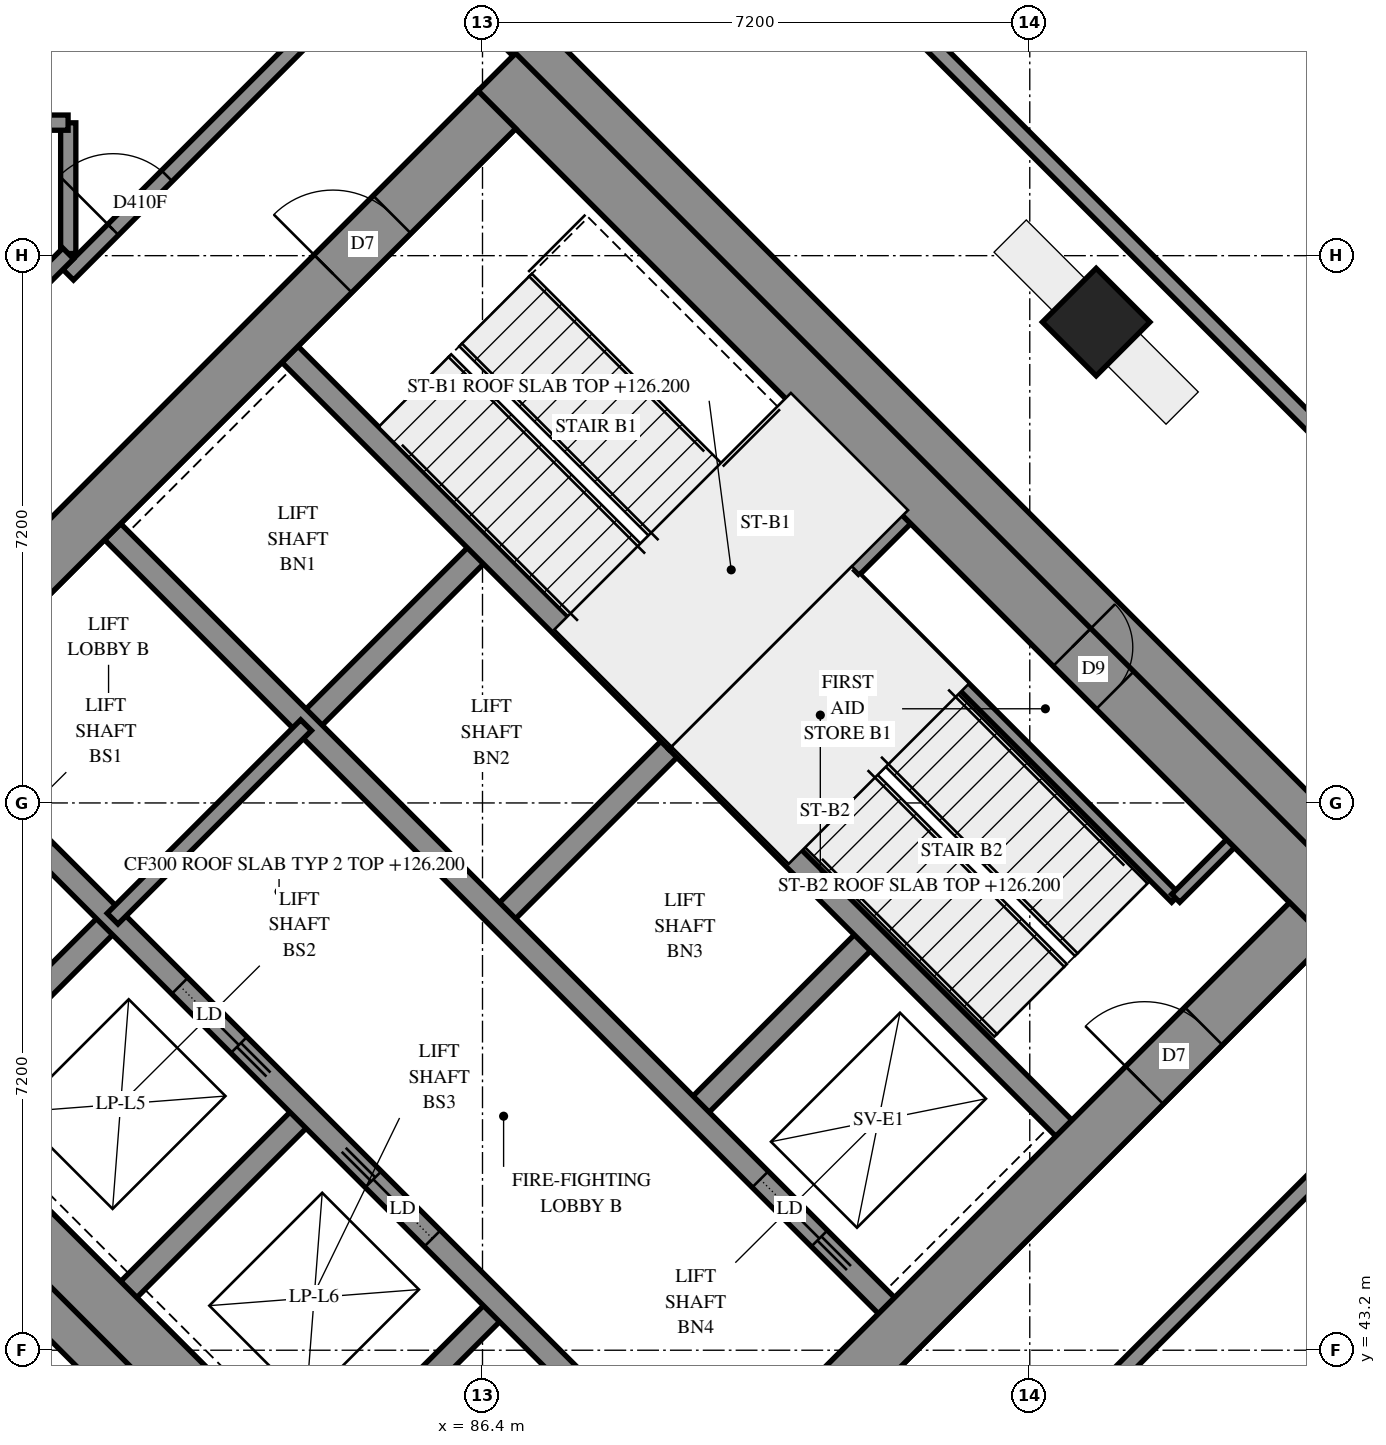
"""IFC4 building model, lengths in metres.
Left out: names, types, materials, properties, quantities, classifications, styles, units other than length and angle.
Written with IfcOpenShell. Run it as: python <this file> out.ifc"""

import sys

from ifc_helpers import new_model, si_unit, direction, frame, frame_2d, origin, origin_2d, place, context, subcontext, project, spatial, polyline, rectangle, outline, extrude, element, fill, save


model = new_model("IFC4")
c1 = context("Model", 3, precision=1e-05, world=origin(), true_north=direction((0.0, 1.0)))
c2 = subcontext(c1, "Body", "Model", "MODEL_VIEW")
j1 = project(units=[si_unit("LENGTHUNIT", "METRE"), si_unit("PLANEANGLEUNIT", "RADIAN")], contexts=[c1])
p1 = place(None, origin())
s1 = spatial("IfcSite", under=j1, at=p1, CompositionType="ELEMENT")
p2 = place(p1, origin())
s2 = spatial("IfcBuilding", under=s1, at=p2, CompositionType="ELEMENT")
p3 = place(p2, frame((0.0, 0.0, 126.2)))
s3 = spatial("IfcBuildingStorey", under=s2, at=p3, CompositionType="ELEMENT", Elevation=126.2)
p4 = place(p3, frame((94.474, 56.727, -0.3), z_axis=(0.0, 0.0, 1.0), x_axis=(0.7071067812, -0.7071067812, 0.0)))
e1 = element("IfcColumn", 1, at=p4, inside=s3, PredefinedType="COLUMN", context=c2, shape_type="SweptSolid", body=[
    extrude(rectangle(XDim=1.0, YDim=1.0, at=origin_2d()), origin(), (0.0, 0.0, 1.0), 5.0),
])
p5 = place(p3, frame((75.912, 49.337, -0.3), z_axis=(0.0, 0.0, 1.0), x_axis=(0.7071036166, -0.7071099457, 0.0)))
e2 = element("IfcWall", 2, at=p5, inside=s3, PredefinedType="SHEAR", context=c2, shape_type="SweptSolid", body=[
    extrude(rectangle(XDim=15.8, YDim=0.7, at=frame_2d((7.9, 0.0))), origin(), (0.0, 0.0, 1.0), 4.3),
])
p6 = place(p3, frame((86.589, 60.014, -0.3), z_axis=(0.0, 0.0, 1.0), x_axis=(0.7071099457, -0.7071036166, 0.0)))
e3 = element("IfcWall", 3, at=p6, inside=s3, PredefinedType="SHEAR", context=c2, shape_type="SweptSolid", body=[
    extrude(rectangle(XDim=15.8, YDim=0.7, at=frame_2d((7.9, 0.0))), origin(), (0.0, 0.0, 1.0), 4.3),
])
p7 = place(p6, frame((10.7, 0.0, 0.3)))
e4 = element("IfcOpeningElement", 4, at=p7, cuts=e3, PredefinedType="OPENING", context=c2, shape_type="SweptSolid", body=[
    extrude(rectangle(XDim=0.8, YDim=2.1, at=frame_2d((0.4, 1.05))), frame((0.0, 0.36, 0.0), z_axis=(0.0, -1.0, 0.0), x_axis=(1.0, 0.0, 0.0)), (0.0, 0.0, 1.0), 0.72),
])
p8 = place(p3, frame((76.407, 49.337, -0.3), z_axis=(0.0, 0.0, 1.0), x_axis=(0.7071067812, 0.7071067812, 0.0)))
e5 = element("IfcWall", 5, at=p8, inside=s3, PredefinedType="SHEAR", context=c2, shape_type="SweptSolid", body=[
    extrude(rectangle(XDim=14.4, YDim=0.7, at=frame_2d((7.2, 0.0))), origin(), (0.0, 0.0, 1.0), 4.3),
])
p9 = place(p8, frame((4.55, 0.0, 0.3)))
e6 = element("IfcOpeningElement", 6, at=p9, cuts=e5, PredefinedType="OPENING", context=c2, shape_type="SweptSolid", body=[
    extrude(rectangle(XDim=1.1, YDim=2.1, at=frame_2d((0.55, 1.05))), frame((0.0, 0.36, 0.0), z_axis=(0.0, -1.0, 0.0), x_axis=(1.0, 0.0, 0.0)), (0.0, 0.0, 1.0), 0.72),
])
p10 = place(p8, frame((11.35, 0.0, 0.3)))
e7 = element("IfcOpeningElement", 7, at=p10, cuts=e5, PredefinedType="OPENING", context=c2, shape_type="SweptSolid", body=[
    extrude(rectangle(XDim=1.1, YDim=2.1, at=frame_2d((0.55, 1.05))), frame((0.0, 0.36, 0.0), z_axis=(0.0, -1.0, 0.0), x_axis=(1.0, 0.0, 0.0)), (0.0, 0.0, 1.0), 0.72),
])
p11 = place(p3, frame((87.084, 38.66, -0.3), z_axis=(0.0, 0.0, 1.0), x_axis=(0.7071067812, 0.7071067812, 0.0)))
e8 = element("IfcWall", 8, at=p11, inside=s3, PredefinedType="SHEAR", context=c2, shape_type="SweptSolid", body=[
    extrude(rectangle(XDim=14.4, YDim=0.7, at=frame_2d((7.2, 0.0))), origin(), (0.0, 0.0, 1.0), 4.3),
])
p12 = place(p11, frame((4.55, 0.0, 0.3)))
e9 = element("IfcOpeningElement", 9, at=p12, cuts=e8, PredefinedType="OPENING", context=c2, shape_type="SweptSolid", body=[
    extrude(rectangle(XDim=1.1, YDim=2.1, at=frame_2d((0.55, 1.05))), frame((0.0, 0.36, 0.0), z_axis=(0.0, -1.0, 0.0), x_axis=(1.0, 0.0, 0.0)), (0.0, 0.0, 1.0), 0.72),
])
p13 = place(p11, frame((11.35, 0.0, 0.3)))
e10 = element("IfcOpeningElement", 10, at=p13, cuts=e8, PredefinedType="OPENING", context=c2, shape_type="SweptSolid", body=[
    extrude(rectangle(XDim=1.1, YDim=2.1, at=frame_2d((0.55, 1.05))), frame((0.0, 0.36, 0.0), z_axis=(0.0, -1.0, 0.0), x_axis=(1.0, 0.0, 0.0)), (0.0, 0.0, 1.0), 0.72),
])
for number, where, z_axis, x_axis in (
    (11, (79.2, 46.544, 0.0), (0.0, 0.0, 1.0), (0.707, 0.707, 0.0)),
    (12, (84.079, 51.423, 0.0), (0.0, 0.0, 1.0), (0.707, 0.707, 0.0)),
):
    element("IfcWall", number, at=place(p3, frame(where, z_axis=z_axis, x_axis=x_axis)), inside=s3, PredefinedType="SOLIDWALL", context=c2, shape_type="SweptSolid", body=[
        extrude(rectangle(XDim=3.3, YDim=0.3, at=frame_2d((1.65, 0.0))), origin(), (0.0, 0.0, 1.0), 4.7),
    ])
p14 = place(p3, frame((81.746, 43.999, 0.0), z_axis=(0.0, 0.0, 1.0), x_axis=(0.7071067812, 0.7071067812, 0.0)))
e13 = element("IfcWall", 13, at=p14, inside=s3, PredefinedType="SOLIDWALL", context=c2, shape_type="SweptSolid", body=[
    extrude(rectangle(XDim=3.3, YDim=0.3, at=frame_2d((1.65, 0.0))), origin(), (0.0, 0.0, 1.0), 4.7),
])
p15 = place(p3, frame((86.625, 48.878, 0.0), z_axis=(0.0, 0.0, 1.0), x_axis=(0.7071067812, 0.7071067812, 0.0)))
e14 = element("IfcWall", 14, at=p15, inside=s3, PredefinedType="SOLIDWALL", context=c2, shape_type="SweptSolid", body=[
    extrude(rectangle(XDim=3.3, YDim=0.3, at=frame_2d((1.65, 0.0))), origin(), (0.0, 0.0, 1.0), 4.7),
])
p16 = place(p3, frame((84.291, 41.453, 0.0), z_axis=(0.0, 0.0, 1.0), x_axis=(0.7071067812, 0.7071067812, 0.0)))
e15 = element("IfcWall", 15, at=p16, inside=s3, PredefinedType="SOLIDWALL", context=c2, shape_type="SweptSolid", body=[
    extrude(rectangle(XDim=3.3, YDim=0.3, at=frame_2d((1.65, 0.0))), origin(), (0.0, 0.0, 1.0), 4.7),
])
p17 = place(p3, frame((89.17, 46.332, 0.0), z_axis=(0.0, 0.0, 1.0), x_axis=(0.7071067812, 0.7071067812, 0.0)))
e16 = element("IfcWall", 16, at=p17, inside=s3, PredefinedType="SOLIDWALL", context=c2, shape_type="SweptSolid", body=[
    extrude(rectangle(XDim=3.3, YDim=0.3, at=frame_2d((1.65, 0.0))), origin(), (0.0, 0.0, 1.0), 4.7),
])
p18 = place(p3, frame((78.988, 51.423, 0.0), z_axis=(0.0, 0.0, 1.0), x_axis=(0.7071067812, -0.7071067812, 0.0)))
e17 = element("IfcWall", 17, at=p18, inside=s3, PredefinedType="SOLIDWALL", context=c2, shape_type="SweptSolid", body=[
    extrude(rectangle(XDim=14.4, YDim=0.3, at=frame_2d((7.2, 0.0))), origin(), (0.0, 0.0, 1.0), 4.7),
])
p19 = place(p18, frame((1.25, 0.0, 0.0)))
e18 = element("IfcOpeningElement", 18, at=p19, cuts=e17, PredefinedType="OPENING", context=c2, shape_type="SweptSolid", body=[
    extrude(rectangle(XDim=1.1, YDim=2.1, at=frame_2d((0.55, 1.05))), frame((0.0, 0.16, 0.0), z_axis=(0.0, -1.0, 0.0), x_axis=(1.0, 0.0, 0.0)), (0.0, 0.0, 1.0), 0.32),
])
p20 = place(p18, frame((4.85, 0.0, 0.0)))
e19 = element("IfcOpeningElement", 19, at=p20, cuts=e17, PredefinedType="OPENING", context=c2, shape_type="SweptSolid", body=[
    extrude(rectangle(XDim=1.1, YDim=2.1, at=frame_2d((0.55, 1.05))), frame((0.0, 0.16, 0.0), z_axis=(0.0, -1.0, 0.0), x_axis=(1.0, 0.0, 0.0)), (0.0, 0.0, 1.0), 0.32),
])
p21 = place(p18, frame((8.45, 0.0, 0.0)))
e20 = element("IfcOpeningElement", 20, at=p21, cuts=e17, PredefinedType="OPENING", context=c2, shape_type="SweptSolid", body=[
    extrude(rectangle(XDim=1.1, YDim=2.1, at=frame_2d((0.55, 1.05))), frame((0.0, 0.16, 0.0), z_axis=(0.0, -1.0, 0.0), x_axis=(1.0, 0.0, 0.0)), (0.0, 0.0, 1.0), 0.32),
])
p22 = place(p18, frame((12.05, 0.0, 0.0)))
e21 = element("IfcOpeningElement", 21, at=p22, cuts=e17, PredefinedType="OPENING", context=c2, shape_type="SweptSolid", body=[
    extrude(rectangle(XDim=1.1, YDim=2.1, at=frame_2d((0.55, 1.05))), frame((0.0, 0.16, 0.0), z_axis=(0.0, -1.0, 0.0), x_axis=(1.0, 0.0, 0.0)), (0.0, 0.0, 1.0), 0.32),
])
p23 = place(p3, frame((81.534, 53.969, 0.0), z_axis=(0.0, 0.0, 1.0), x_axis=(0.707103309, -0.7071102534, 0.0)))
e22 = element("IfcWall", 22, at=p23, inside=s3, PredefinedType="SOLIDWALL", context=c2, shape_type="SweptSolid", body=[
    extrude(rectangle(XDim=14.4, YDim=0.3, at=frame_2d((7.2, 0.0))), origin(), (0.0, 0.0, 1.0), 4.7),
])
p24 = place(p23, frame((12.05, 0.0, 0.0)))
e23 = element("IfcOpeningElement", 23, at=p24, cuts=e22, PredefinedType="OPENING", context=c2, shape_type="SweptSolid", body=[
    extrude(rectangle(XDim=1.1, YDim=2.1, at=frame_2d((0.55, 1.05))), frame((0.0, 0.16, 0.0), z_axis=(0.0, -1.0, 0.0), x_axis=(1.0, 0.0, 0.0)), (0.0, 0.0, 1.0), 0.32),
])
for number, where, z_axis, x_axis in (
    (24, (83.867, 56.302, 0.0), (0.0, 0.0, 1.0), (0.707, -0.707, 0.0)),
    (25, (88.958, 51.211, 0.0), (0.0, 0.0, 1.0), (0.707, -0.707, 0.0)),
):
    element("IfcWall", number, at=place(p3, frame(where, z_axis=z_axis, x_axis=x_axis)), inside=s3, PredefinedType="SOLIDWALL", context=c2, shape_type="SweptSolid", body=[
        extrude(rectangle(XDim=7.2, YDim=0.3, at=frame_2d((3.6, 0.0))), origin(), (0.0, 0.0, 1.0), 4.7),
    ])
p25 = place(p3, frame((88.958, 51.211, 0.0), z_axis=(0.0, 0.0, 1.0), x_axis=(0.7071067812, 0.7071067812, 0.0)))
e26 = element("IfcWall", 26, at=p25, inside=s3, PredefinedType="SOLIDWALL", context=c2, shape_type="SweptSolid", body=[
    extrude(rectangle(XDim=4.2, YDim=0.3, at=frame_2d((2.1, 0.0))), origin(), (0.0, 0.0, 1.0), 4.7),
])
p26 = place(p3, frame((104.267, 43.15, 0.0), z_axis=(0.0, 0.0, 1.0), x_axis=(-0.7071054305, 0.7071081319, 0.0)))
e27 = element("IfcWall", 27, at=p26, inside=s3, PredefinedType="SOLIDWALL", context=c2, shape_type="SweptSolid", body=[
    extrude(outline(polyline([(-0.275, -0.275), (37.131, -0.275), (36.903, 0.275), (0.275, 0.275), (-0.275, -0.275)])), origin(), (0.0, 0.0, 1.0), 4.7),
])
p27 = place(p26, frame((3.325, 0.0, 0.9)))
e28 = element("IfcOpeningElement", 28, at=p27, cuts=e27, PredefinedType="OPENING", context=c2, shape_type="SweptSolid", body=[
    extrude(rectangle(XDim=1.8, YDim=2.4, at=frame_2d((0.9, 1.2))), frame((0.0, 0.285, 0.0), z_axis=(0.0, -1.0, 0.0), x_axis=(1.0, 0.0, 0.0)), (0.0, 0.0, 1.0), 0.57),
])
p28 = place(p26, frame((6.675, 0.0, 0.9)))
e29 = element("IfcOpeningElement", 29, at=p28, cuts=e27, PredefinedType="OPENING", context=c2, shape_type="SweptSolid", body=[
    extrude(rectangle(XDim=1.8, YDim=2.4, at=frame_2d((0.9, 1.2))), frame((0.0, 0.285, 0.0), z_axis=(0.0, -1.0, 0.0), x_axis=(1.0, 0.0, 0.0)), (0.0, 0.0, 1.0), 0.57),
])
p29 = place(p26, frame((24.625, 0.0, 0.9)))
e30 = element("IfcOpeningElement", 30, at=p29, cuts=e27, PredefinedType="OPENING", context=c2, shape_type="SweptSolid", body=[
    extrude(rectangle(XDim=1.8, YDim=2.4, at=frame_2d((0.9, 1.2))), frame((0.0, 0.285, 0.0), z_axis=(0.0, -1.0, 0.0), x_axis=(1.0, 0.0, 0.0)), (0.0, 0.0, 1.0), 0.57),
])
p30 = place(p26, frame((28.225, 0.0, 0.9)))
e31 = element("IfcOpeningElement", 31, at=p30, cuts=e27, PredefinedType="OPENING", context=c2, shape_type="SweptSolid", body=[
    extrude(rectangle(XDim=1.8, YDim=2.4, at=frame_2d((0.9, 1.2))), frame((0.0, 0.285, 0.0), z_axis=(0.0, -1.0, 0.0), x_axis=(1.0, 0.0, 0.0)), (0.0, 0.0, 1.0), 0.57),
])
p31 = place(p26, frame((31.825, 0.0, 0.9)))
e32 = element("IfcOpeningElement", 32, at=p31, cuts=e27, PredefinedType="OPENING", context=c2, shape_type="SweptSolid", body=[
    extrude(rectangle(XDim=1.8, YDim=2.4, at=frame_2d((0.9, 1.2))), frame((0.0, 0.285, 0.0), z_axis=(0.0, -1.0, 0.0), x_axis=(1.0, 0.0, 0.0)), (0.0, 0.0, 1.0), 0.57),
])
p32 = place(p26, frame((34.714, 0.0, 0.9)))
e33 = element("IfcOpeningElement", 33, at=p32, cuts=e27, PredefinedType="OPENING", context=c2, shape_type="SweptSolid", body=[
    extrude(rectangle(XDim=1.8, YDim=2.4, at=frame_2d((0.9, 1.2))), frame((0.0, 0.285, 0.0), z_axis=(0.0, -1.0, 0.0), x_axis=(1.0, 0.0, 0.0)), (0.0, 0.0, 1.0), 0.57),
])
p33 = place(p3, frame((78.561, 45.875, 0.0), z_axis=(0.0, 0.0, 1.0), x_axis=(0.7071067812, -0.7071067812, 0.0)))
e34 = element("IfcWall", 34, at=p33, inside=s3, PredefinedType="SOLIDWALL", context=c2, shape_type="SweptSolid", body=[
    extrude(outline(polyline([(0.114, -0.275), (22.779, -0.275), (22.229, 0.275), (-0.114, 0.275), (0.114, -0.275)])), origin(), (0.0, 0.0, 1.0), 4.7),
])
p34 = place(p33, frame((11.679, 0.0, 0.9)))
e35 = element("IfcOpeningElement", 35, at=p34, cuts=e34, PredefinedType="OPENING", context=c2, shape_type="SweptSolid", body=[
    extrude(rectangle(XDim=1.8, YDim=2.4, at=frame_2d((0.9, 1.2))), frame((0.0, 0.285, 0.0), z_axis=(0.0, -1.0, 0.0), x_axis=(1.0, 0.0, 0.0)), (0.0, 0.0, 1.0), 0.57),
])
p35 = place(p33, frame((15.279, 0.0, 0.9)))
e36 = element("IfcOpeningElement", 36, at=p35, cuts=e34, PredefinedType="OPENING", context=c2, shape_type="SweptSolid", body=[
    extrude(rectangle(XDim=1.8, YDim=2.4, at=frame_2d((0.9, 1.2))), frame((0.0, 0.285, 0.0), z_axis=(0.0, -1.0, 0.0), x_axis=(1.0, 0.0, 0.0)), (0.0, 0.0, 1.0), 0.57),
])
p36 = place(p33, frame((18.879, 0.0, 0.9)))
e37 = element("IfcOpeningElement", 37, at=p36, cuts=e34, PredefinedType="OPENING", context=c2, shape_type="SweptSolid", body=[
    extrude(rectangle(XDim=1.8, YDim=2.4, at=frame_2d((0.9, 1.2))), frame((0.0, 0.285, 0.0), z_axis=(0.0, -1.0, 0.0), x_axis=(1.0, 0.0, 0.0)), (0.0, 0.0, 1.0), 0.57),
])
p37 = place(p3, frame((107.838, 44.847, 0.0), z_axis=(0.0, 0.0, 1.0), x_axis=(-0.7071067812, 0.7071067812, 0.0)))
e38 = element("IfcWall", 38, at=p37, inside=s3, PredefinedType="SOLIDWALL", context=c2, shape_type="SweptSolid", body=[
    extrude(outline(polyline([(-0.1, -0.1), (39.926, -0.1), (39.843, 0.1), (0.1, 0.1), (-0.1, -0.1)])), origin(), (0.0, 0.0, 1.0), 4.7),
])
p38 = place(p3, frame((91.313, 53.354, 0.0), z_axis=(0.0, 0.0, 1.0), x_axis=(0.7071067812, -0.7071067812, 0.0)))
e39 = element("IfcWall", 39, at=p38, inside=s3, PredefinedType="PARTITIONING", context=c2, shape_type="SweptSolid", body=[
    extrude(rectangle(XDim=5.95, YDim=0.15, at=frame_2d((2.975, 0.0))), origin(), (0.0, 0.0, 1.0), 4.7),
])
p39 = place(p3, frame((95.52, 49.146, 0.0), z_axis=(0.0, 0.0, 1.0), x_axis=(0.7071067812, 0.7071067812, 0.0)))
e40 = element("IfcWall", 40, at=p39, inside=s3, PredefinedType="PARTITIONING", context=c2, shape_type="SweptSolid", body=[
    extrude(rectangle(XDim=1.02, YDim=0.15, at=frame_2d((0.51, 0.0))), origin(), (0.0, 0.0, 1.0), 4.7),
])
p40 = place(p3, frame((81.534, 48.878, 0.0), z_axis=(0.0, 0.0, 1.0), x_axis=(0.707092892, 0.7071206701, 0.0)))
e41 = element("IfcWall", 41, at=p40, inside=s3, PredefinedType="PARTITIONING", context=c2, shape_type="SweptSolid", body=[
    extrude(rectangle(XDim=3.6, YDim=0.2, at=frame_2d((1.8, 0.0))), origin(), (0.0, 0.0, 1.0), 4.7),
])
p41 = place(p3, frame((94.65, 42.762, 0.0), z_axis=(0.0, 0.0, 1.0), x_axis=(0.7071067812, 0.7071067812, 0.0)))
e42 = element("IfcWall", 42, at=p41, inside=s3, PredefinedType="PARTITIONING", context=c2, shape_type="SweptSolid", body=[
    extrude(rectangle(XDim=6.8, YDim=0.2, at=frame_2d((3.4, 0.0))), origin(), (0.0, 0.0, 1.0), 4.7),
])
p42 = place(p3, frame((80.949, 57.349, 0.0), z_axis=(0.0, 0.0, 1.0), x_axis=(0.706944768, 0.7072687573, 0.0)))
e43 = element("IfcWall", 43, at=p42, inside=s3, PredefinedType="PARTITIONING", context=c2, shape_type="SweptSolid", body=[
    extrude(rectangle(XDim=6.173, YDim=0.2, at=frame_2d((3.087, 0.0))), origin(), (0.0, 0.0, 1.0), 4.7),
])
p43 = place(p42, frame((0.838, 0.0, 0.0)))
e44 = element("IfcOpeningElement", 44, at=p43, cuts=e43, PredefinedType="OPENING", context=c2, shape_type="SweptSolid", body=[
    extrude(rectangle(XDim=1.0, YDim=2.1, at=frame_2d((0.5, 1.05))), frame((0.0, 0.11, 0.0), z_axis=(0.0, -1.0, 0.0), x_axis=(1.0, 0.0, 0.0)), (0.0, 0.0, 1.0), 0.22),
])
p44 = place(p3, frame((80.95, 57.628, 0.0), z_axis=(0.0, 0.0, 1.0), x_axis=(0.0, 1.0, 0.0)))
e45 = element("IfcWall", 45, at=p44, inside=s3, PredefinedType="PARTITIONING", context=c2, shape_type="SweptSolid", body=[
    extrude(rectangle(XDim=1.72, YDim=0.2, at=frame_2d((0.86, 0.0))), origin(), (0.0, 0.0, 1.0), 4.7),
])
p45 = place(p3, frame((79.801, 56.481, 0.0), z_axis=(0.0, 0.0, 1.0), x_axis=(0.7071067812, 0.7071067812, 0.0)))
e46 = element("IfcWall", 46, at=p45, inside=s3, PredefinedType="PARTITIONING", context=c2, shape_type="SweptSolid", body=[
    extrude(rectangle(XDim=1.623, YDim=0.2, at=frame_2d((0.812, 0.0))), origin(), (0.0, 0.0, 1.0), 4.7),
])
p46 = place(p3, frame((79.8, 59.35, 0.0), z_axis=(0.0, 0.0, 1.0), x_axis=(1.0, 0.0, 0.0)))
e47 = element("IfcWall", 47, at=p46, inside=s3, PredefinedType="PARTITIONING", context=c2, shape_type="SweptSolid", body=[
    extrude(rectangle(XDim=1.148, YDim=0.2, at=frame_2d((0.574, 0.0))), origin(), (0.0, 0.0, 1.0), 4.7),
])
p47 = place(p7, origin())
e48 = element("IfcDoor", 48, at=p47, inside=s3, OperationType="SINGLE_SWING_RIGHT", PredefinedType="DOOR", context=c2, shape_type="SweptSolid", body=[
    extrude(rectangle(XDim=0.8, YDim=2.1, at=frame_2d((0.4, 1.05))), frame((0.0, -0.29, 0.0), z_axis=(0.0, -1.0, 0.0), x_axis=(1.0, 0.0, 0.0)), (0.0, 0.0, 1.0), 0.05),
])
fill(e4, e48)
p48 = place(p10, origin())
e49 = element("IfcDoor", 49, at=p48, inside=s3, OperationType="SINGLE_SWING_LEFT", PredefinedType="DOOR", context=c2, shape_type="SweptSolid", body=[
    extrude(rectangle(XDim=1.1, YDim=2.1, at=frame_2d((0.55, 1.05))), frame((0.0, 0.025, 0.0), z_axis=(0.0, -1.0, 0.0), x_axis=(1.0, 0.0, 0.0)), (0.0, 0.0, 1.0), 0.05),
])
fill(e7, e49)
p49 = place(p13, origin())
e50 = element("IfcDoor", 50, at=p49, inside=s3, OperationType="SINGLE_SWING_RIGHT", PredefinedType="DOOR", context=c2, shape_type="SweptSolid", body=[
    extrude(rectangle(XDim=1.1, YDim=2.1, at=frame_2d((0.55, 1.05))), frame((0.0, 0.025, 0.0), z_axis=(0.0, -1.0, 0.0), x_axis=(1.0, 0.0, 0.0)), (0.0, 0.0, 1.0), 0.05),
])
fill(e10, e50)
p50 = place(p20, origin())
e51 = element("IfcDoor", 51, at=p50, inside=s3, OperationType="SLIDING_TO_RIGHT", PredefinedType="DOOR", context=c2, shape_type="SweptSolid", body=[
    extrude(rectangle(XDim=1.1, YDim=2.1, at=frame_2d((0.55, 1.05))), frame((0.0, 0.025, 0.0), z_axis=(0.0, -1.0, 0.0), x_axis=(1.0, 0.0, 0.0)), (0.0, 0.0, 1.0), 0.05),
])
fill(e19, e51)
p51 = place(p21, origin())
e52 = element("IfcDoor", 52, at=p51, inside=s3, OperationType="SLIDING_TO_LEFT", PredefinedType="DOOR", context=c2, shape_type="SweptSolid", body=[
    extrude(rectangle(XDim=1.1, YDim=2.1, at=frame_2d((0.55, 1.05))), frame((0.0, 0.025, 0.0), z_axis=(0.0, -1.0, 0.0), x_axis=(1.0, 0.0, 0.0)), (0.0, 0.0, 1.0), 0.05),
])
fill(e20, e52)
p52 = place(p24, origin())
e53 = element("IfcDoor", 53, at=p52, inside=s3, OperationType="SLIDING_TO_RIGHT", PredefinedType="DOOR", context=c2, shape_type="SweptSolid", body=[
    extrude(rectangle(XDim=1.1, YDim=2.1, at=frame_2d((0.55, 1.05))), frame((0.0, 0.025, 0.0), z_axis=(0.0, -1.0, 0.0), x_axis=(1.0, 0.0, 0.0)), (0.0, 0.0, 1.0), 0.05),
])
fill(e23, e53)
p53 = place(p43, origin())
e54 = element("IfcDoor", 54, at=p53, inside=s3, OperationType="SINGLE_SWING_RIGHT", PredefinedType="DOOR", context=c2, shape_type="SweptSolid", body=[
    extrude(rectangle(XDim=1.0, YDim=2.1, at=frame_2d((0.5, 1.05))), frame((0.0, 0.025, 0.0), z_axis=(0.0, -1.0, 0.0), x_axis=(1.0, 0.0, 0.0)), (0.0, 0.0, 1.0), 0.05),
])
fill(e44, e54)
save(model, sys.argv[1])
